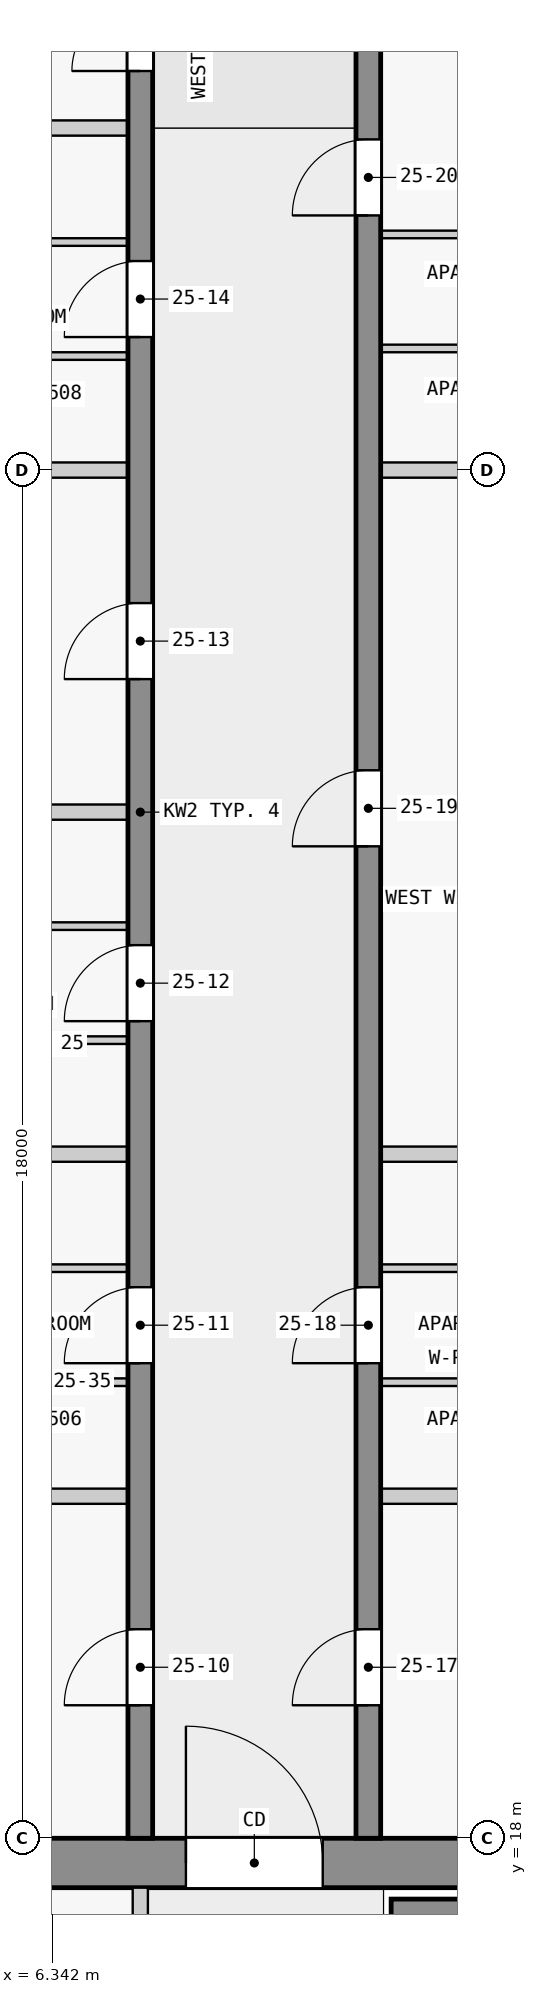
"""IFC4 building model, lengths in metres.
Left out: names, types, materials, properties, quantities, classifications, styles, units other than length and angle.
Written with IfcOpenShell. Run it as: python <this file> out.ifc"""

import sys

from ifc_helpers import new_model, si_unit, direction, frame, frame_2d, origin, place, context, subcontext, project, spatial, rectangle, extrude, element, fill, save


model = new_model("IFC4")
c1 = context("Model", 3, precision=1e-05, world=origin(), true_north=direction((0.0, 1.0)))
c2 = subcontext(c1, "Body", "Model", "MODEL_VIEW")
j1 = project(units=[si_unit("LENGTHUNIT", "METRE"), si_unit("PLANEANGLEUNIT", "RADIAN")], contexts=[c1])
p1 = place(None, origin())
s1 = spatial("IfcSite", under=j1, at=p1, CompositionType="ELEMENT")
p2 = place(p1, origin())
s2 = spatial("IfcBuilding", under=s1, at=p2, CompositionType="ELEMENT")
p3 = place(p2, frame((0.0, 0.0, 99.3)))
s3 = spatial("IfcBuildingStorey", under=s2, at=p3, CompositionType="ELEMENT", Elevation=99.3)
p4 = place(p3, frame((1.65, 17.675, 0.0), z_axis=(0.0, 0.0, 1.0), x_axis=(1.0, 0.0, 0.0)))
e1 = element("IfcWall", 1, at=p4, inside=s3, PredefinedType="SHEAR", context=c2, shape_type="SweptSolid", body=[
    extrude(rectangle(XDim=20.85, YDim=0.65, at=frame_2d((10.425, 0.0))), origin(), (0.0, 0.0, 1.0), 3.25),
])
p5 = place(p4, frame((6.45, 0.0, 0.0)))
e2 = element("IfcOpeningElement", 2, at=p5, cuts=e1, PredefinedType="OPENING", context=c2, shape_type="SweptSolid", body=[
    extrude(rectangle(XDim=1.8, YDim=2.1, at=frame_2d((0.9, 1.05))), frame((0.0, 0.335, 0.0), z_axis=(0.0, -1.0, 0.0), x_axis=(1.0, 0.0, 0.0)), (0.0, 0.0, 1.0), 0.67),
])
p6 = place(p3, frame((10.8, 17.05, 0.0), z_axis=(0.0, 0.0, 1.0), x_axis=(1.0, 0.0, 0.0)))
e3 = element("IfcWall", 3, at=p6, inside=s3, PredefinedType="SHEAR", context=c2, shape_type="SweptSolid", body=[
    extrude(rectangle(XDim=7.8, YDim=0.3, at=frame_2d((3.9, 0.0))), origin(), (0.0, 0.0, 1.0), 3.25),
])
p7 = place(p3, frame((7.5, 18.0, 0.0), z_axis=(0.0, 0.0, 1.0), x_axis=(0.0, 1.0, 0.0)))
e4 = element("IfcWall", 4, at=p7, inside=s3, PredefinedType="SHEAR", context=c2, shape_type="SweptSolid", body=[
    extrude(rectangle(XDim=27.0, YDim=0.325, at=frame_2d((13.5, 0.0))), origin(), (0.0, 0.0, 1.0), 3.25),
])
p8 = place(p7, frame((1.75, 0.0, 0.0)))
e5 = element("IfcOpeningElement", 5, at=p8, cuts=e4, PredefinedType="OPENING", context=c2, shape_type="SweptSolid", body=[
    extrude(rectangle(XDim=1.0, YDim=2.1, at=frame_2d((0.5, 1.05))), frame((0.0, 0.172, 0.0), z_axis=(0.0, -1.0, 0.0), x_axis=(1.0, 0.0, 0.0)), (0.0, 0.0, 1.0), 0.345),
])
p9 = place(p7, frame((6.25, 0.0, 0.0)))
e6 = element("IfcOpeningElement", 6, at=p9, cuts=e4, PredefinedType="OPENING", context=c2, shape_type="SweptSolid", body=[
    extrude(rectangle(XDim=1.0, YDim=2.1, at=frame_2d((0.5, 1.05))), frame((0.0, 0.172, 0.0), z_axis=(0.0, -1.0, 0.0), x_axis=(1.0, 0.0, 0.0)), (0.0, 0.0, 1.0), 0.345),
])
p10 = place(p7, frame((10.75, 0.0, 0.0)))
e7 = element("IfcOpeningElement", 7, at=p10, cuts=e4, PredefinedType="OPENING", context=c2, shape_type="SweptSolid", body=[
    extrude(rectangle(XDim=1.0, YDim=2.1, at=frame_2d((0.5, 1.05))), frame((0.0, 0.172, 0.0), z_axis=(0.0, -1.0, 0.0), x_axis=(1.0, 0.0, 0.0)), (0.0, 0.0, 1.0), 0.345),
])
p11 = place(p7, frame((15.25, 0.0, 0.0)))
e8 = element("IfcOpeningElement", 8, at=p11, cuts=e4, PredefinedType="OPENING", context=c2, shape_type="SweptSolid", body=[
    extrude(rectangle(XDim=1.0, YDim=2.1, at=frame_2d((0.5, 1.05))), frame((0.0, 0.172, 0.0), z_axis=(0.0, -1.0, 0.0), x_axis=(1.0, 0.0, 0.0)), (0.0, 0.0, 1.0), 0.345),
])
p12 = place(p7, frame((19.75, 0.0, 0.0)))
e9 = element("IfcOpeningElement", 9, at=p12, cuts=e4, PredefinedType="OPENING", context=c2, shape_type="SweptSolid", body=[
    extrude(rectangle(XDim=1.0, YDim=2.1, at=frame_2d((0.5, 1.05))), frame((0.0, 0.172, 0.0), z_axis=(0.0, -1.0, 0.0), x_axis=(1.0, 0.0, 0.0)), (0.0, 0.0, 1.0), 0.345),
])
p13 = place(p7, frame((23.25, 0.0, 0.0)))
e10 = element("IfcOpeningElement", 10, at=p13, cuts=e4, PredefinedType="OPENING", context=c2, shape_type="SweptSolid", body=[
    extrude(rectangle(XDim=0.9, YDim=2.1, at=frame_2d((0.45, 1.05))), frame((0.0, 0.172, 0.0), z_axis=(0.0, -1.0, 0.0), x_axis=(1.0, 0.0, 0.0)), (0.0, 0.0, 1.0), 0.345),
])
p14 = place(p7, frame((25.45, 0.0, 0.0)))
e11 = element("IfcOpeningElement", 11, at=p14, cuts=e4, PredefinedType="OPENING", context=c2, shape_type="SweptSolid", body=[
    extrude(rectangle(XDim=1.0, YDim=2.1, at=frame_2d((0.5, 1.05))), frame((0.0, 0.172, 0.0), z_axis=(0.0, -1.0, 0.0), x_axis=(1.0, 0.0, 0.0)), (0.0, 0.0, 1.0), 0.345),
])
p15 = place(p3, frame((10.5, 18.0, 0.0), z_axis=(0.0, 0.0, 1.0), x_axis=(0.0, 1.0, 0.0)))
e12 = element("IfcWall", 12, at=p15, inside=s3, PredefinedType="SHEAR", context=c2, shape_type="SweptSolid", body=[
    extrude(rectangle(XDim=27.0, YDim=0.325, at=frame_2d((13.5, 0.0))), origin(), (0.0, 0.0, 1.0), 3.25),
])
p16 = place(p15, frame((1.75, 0.0, 0.0)))
e13 = element("IfcOpeningElement", 13, at=p16, cuts=e12, PredefinedType="OPENING", context=c2, shape_type="SweptSolid", body=[
    extrude(rectangle(XDim=1.0, YDim=2.1, at=frame_2d((0.5, 1.05))), frame((0.0, 0.172, 0.0), z_axis=(0.0, -1.0, 0.0), x_axis=(1.0, 0.0, 0.0)), (0.0, 0.0, 1.0), 0.345),
])
p17 = place(p15, frame((6.25, 0.0, 0.0)))
e14 = element("IfcOpeningElement", 14, at=p17, cuts=e12, PredefinedType="OPENING", context=c2, shape_type="SweptSolid", body=[
    extrude(rectangle(XDim=1.0, YDim=2.1, at=frame_2d((0.5, 1.05))), frame((0.0, 0.172, 0.0), z_axis=(0.0, -1.0, 0.0), x_axis=(1.0, 0.0, 0.0)), (0.0, 0.0, 1.0), 0.345),
])
p18 = place(p15, frame((13.05, 0.0, 0.0)))
e15 = element("IfcOpeningElement", 15, at=p18, cuts=e12, PredefinedType="OPENING", context=c2, shape_type="SweptSolid", body=[
    extrude(rectangle(XDim=1.0, YDim=2.1, at=frame_2d((0.5, 1.05))), frame((0.0, 0.172, 0.0), z_axis=(0.0, -1.0, 0.0), x_axis=(1.0, 0.0, 0.0)), (0.0, 0.0, 1.0), 0.345),
])
p19 = place(p15, frame((21.35, 0.0, 0.0)))
e16 = element("IfcOpeningElement", 16, at=p19, cuts=e12, PredefinedType="OPENING", context=c2, shape_type="SweptSolid", body=[
    extrude(rectangle(XDim=1.0, YDim=2.1, at=frame_2d((0.5, 1.05))), frame((0.0, 0.172, 0.0), z_axis=(0.0, -1.0, 0.0), x_axis=(1.0, 0.0, 0.0)), (0.0, 0.0, 1.0), 0.345),
])
p20 = place(p3, frame((7.5, 10.1, 0.0), z_axis=(0.0, 0.0, 1.0), x_axis=(0.0, 1.0, 0.0)))
e17 = element("IfcWall", 17, at=p20, inside=s3, PredefinedType="PARTITIONING", context=c2, shape_type="SweptSolid", body=[
    extrude(rectangle(XDim=7.25, YDim=0.2, at=frame_2d((3.625, 0.0))), origin(), (0.0, 0.0, 1.0), 3.25),
])
p21 = place(p20, frame((1.05, 0.0, 0.0)))
e18 = element("IfcOpeningElement", 18, at=p21, cuts=e17, PredefinedType="OPENING", context=c2, shape_type="SweptSolid", body=[
    extrude(rectangle(XDim=0.9, YDim=2.1, at=frame_2d((0.45, 1.05))), frame((0.0, 0.11, 0.0), z_axis=(0.0, -1.0, 0.0), x_axis=(1.0, 0.0, 0.0)), (0.0, 0.0, 1.0), 0.22),
])
p22 = place(p20, frame((4.675, 0.0, 0.0)))
e19 = element("IfcOpeningElement", 19, at=p22, cuts=e17, PredefinedType="OPENING", context=c2, shape_type="SweptSolid", body=[
    extrude(rectangle(XDim=0.9, YDim=2.1, at=frame_2d((0.45, 1.05))), frame((0.0, 0.11, 0.0), z_axis=(0.0, -1.0, 0.0), x_axis=(1.0, 0.0, 0.0)), (0.0, 0.0, 1.0), 0.22),
])
for number, where, z_axis, x_axis in (
    (20, (7.337, 22.5, 0.0), (0.0, 0.0, 1.0), (-1.0, 0.0, 0.0)),
    (21, (17.85, 22.5, 0.0), (0.0, 0.0, 1.0), (-1.0, 0.0, 0.0)),
):
    element("IfcWall", number, at=place(p3, frame(where, z_axis=z_axis, x_axis=x_axis)), inside=s3, PredefinedType="PARTITIONING", context=c2, shape_type="SweptSolid", body=[
        extrude(rectangle(XDim=7.188, YDim=0.2, at=frame_2d((3.594, 0.0))), origin(), (0.0, 0.0, 1.0), 3.25),
    ])
p23 = place(p3, frame((7.337, 24.0, 0.0), z_axis=(0.0, 0.0, 1.0), x_axis=(-1.0, 0.0, 0.0)))
e22 = element("IfcWall", 22, at=p23, inside=s3, PredefinedType="PARTITIONING", context=c2, shape_type="SweptSolid", body=[
    extrude(rectangle(XDim=3.4, YDim=0.1, at=frame_2d((1.7, 0.0))), origin(), (0.0, 0.0, 1.0), 3.25),
])
p24 = place(p23, frame((1.25, 0.0, 0.0)))
e23 = element("IfcOpeningElement", 23, at=p24, cuts=e22, PredefinedType="OPENING", context=c2, shape_type="SweptSolid", body=[
    extrude(rectangle(XDim=0.9, YDim=2.1, at=frame_2d((0.45, 1.05))), frame((0.0, 0.06, 0.0), z_axis=(0.0, -1.0, 0.0), x_axis=(1.0, 0.0, 0.0)), (0.0, 0.0, 1.0), 0.12),
])
p25 = place(p3, frame((14.062, 24.0, 0.0), z_axis=(0.0, 0.0, 1.0), x_axis=(-1.0, 0.0, 0.0)))
e24 = element("IfcWall", 24, at=p25, inside=s3, PredefinedType="PARTITIONING", context=c2, shape_type="SweptSolid", body=[
    extrude(rectangle(XDim=3.4, YDim=0.1, at=frame_2d((1.7, 0.0))), origin(), (0.0, 0.0, 1.0), 3.25),
])
p26 = place(p25, frame((1.25, 0.0, 0.0)))
e25 = element("IfcOpeningElement", 25, at=p26, cuts=e24, PredefinedType="OPENING", context=c2, shape_type="SweptSolid", body=[
    extrude(rectangle(XDim=0.9, YDim=2.1, at=frame_2d((0.45, 1.05))), frame((0.0, 0.06, 0.0), z_axis=(0.0, -1.0, 0.0), x_axis=(1.0, 0.0, 0.0)), (0.0, 0.0, 1.0), 0.12),
])
p27 = place(p3, frame((3.938, 25.5, 0.0), z_axis=(0.0, 0.0, 1.0), x_axis=(1.0, 0.0, 0.0)))
e26 = element("IfcWall", 26, at=p27, inside=s3, PredefinedType="PARTITIONING", context=c2, shape_type="SweptSolid", body=[
    extrude(rectangle(XDim=3.4, YDim=0.1, at=frame_2d((1.7, 0.0))), origin(), (0.0, 0.0, 1.0), 3.25),
])
p28 = place(p27, frame((1.25, 0.0, 0.0)))
e27 = element("IfcOpeningElement", 27, at=p28, cuts=e26, PredefinedType="OPENING", context=c2, shape_type="SweptSolid", body=[
    extrude(rectangle(XDim=0.9, YDim=2.1, at=frame_2d((0.45, 1.05))), frame((0.0, 0.06, 0.0), z_axis=(0.0, -1.0, 0.0), x_axis=(1.0, 0.0, 0.0)), (0.0, 0.0, 1.0), 0.12),
])
p29 = place(p3, frame((10.663, 25.5, 0.0), z_axis=(0.0, 0.0, 1.0), x_axis=(1.0, 0.0, 0.0)))
e28 = element("IfcWall", 28, at=p29, inside=s3, PredefinedType="PARTITIONING", context=c2, shape_type="SweptSolid", body=[
    extrude(rectangle(XDim=3.4, YDim=0.1, at=frame_2d((1.7, 0.0))), origin(), (0.0, 0.0, 1.0), 3.25),
])
p30 = place(p29, frame((1.25, 0.0, 0.0)))
e29 = element("IfcOpeningElement", 29, at=p30, cuts=e28, PredefinedType="OPENING", context=c2, shape_type="SweptSolid", body=[
    extrude(rectangle(XDim=0.9, YDim=2.1, at=frame_2d((0.45, 1.05))), frame((0.0, 0.06, 0.0), z_axis=(0.0, -1.0, 0.0), x_axis=(1.0, 0.0, 0.0)), (0.0, 0.0, 1.0), 0.12),
])
for number, where, z_axis, x_axis in (
    (30, (7.337, 27.0, 0.0), (0.0, 0.0, 1.0), (-1.0, 0.0, 0.0)),
    (31, (13.962, 27.0, 0.0), (0.0, 0.0, 1.0), (-1.0, 0.0, 0.0)),
):
    element("IfcWall", number, at=place(p3, frame(where, z_axis=z_axis, x_axis=x_axis)), inside=s3, PredefinedType="PARTITIONING", context=c2, shape_type="SweptSolid", body=[
        extrude(rectangle(XDim=3.3, YDim=0.2, at=frame_2d((1.65, 0.0))), origin(), (0.0, 0.0, 1.0), 3.25),
    ])
p31 = place(p3, frame((7.337, 28.5, 0.0), z_axis=(0.0, 0.0, 1.0), x_axis=(-1.0, 0.0, 0.0)))
e32 = element("IfcWall", 32, at=p31, inside=s3, PredefinedType="PARTITIONING", context=c2, shape_type="SweptSolid", body=[
    extrude(rectangle(XDim=3.4, YDim=0.1, at=frame_2d((1.7, 0.0))), origin(), (0.0, 0.0, 1.0), 3.25),
])
p32 = place(p31, frame((1.25, 0.0, 0.0)))
e33 = element("IfcOpeningElement", 33, at=p32, cuts=e32, PredefinedType="OPENING", context=c2, shape_type="SweptSolid", body=[
    extrude(rectangle(XDim=0.9, YDim=2.1, at=frame_2d((0.45, 1.05))), frame((0.0, 0.06, 0.0), z_axis=(0.0, -1.0, 0.0), x_axis=(1.0, 0.0, 0.0)), (0.0, 0.0, 1.0), 0.12),
])
p33 = place(p3, frame((3.938, 30.0, 0.0), z_axis=(0.0, 0.0, 1.0), x_axis=(1.0, 0.0, 0.0)))
e34 = element("IfcWall", 34, at=p33, inside=s3, PredefinedType="PARTITIONING", context=c2, shape_type="SweptSolid", body=[
    extrude(rectangle(XDim=3.4, YDim=0.1, at=frame_2d((1.7, 0.0))), origin(), (0.0, 0.0, 1.0), 3.25),
])
p34 = place(p33, frame((1.25, 0.0, 0.0)))
e35 = element("IfcOpeningElement", 35, at=p34, cuts=e34, PredefinedType="OPENING", context=c2, shape_type="SweptSolid", body=[
    extrude(rectangle(XDim=0.9, YDim=2.1, at=frame_2d((0.45, 1.05))), frame((0.0, 0.06, 0.0), z_axis=(0.0, -1.0, 0.0), x_axis=(1.0, 0.0, 0.0)), (0.0, 0.0, 1.0), 0.12),
])
p35 = place(p3, frame((7.337, 31.5, 0.0), z_axis=(0.0, 0.0, 1.0), x_axis=(-1.0, 0.0, 0.0)))
e36 = element("IfcWall", 36, at=p35, inside=s3, PredefinedType="PARTITIONING", context=c2, shape_type="SweptSolid", body=[
    extrude(rectangle(XDim=3.3, YDim=0.2, at=frame_2d((1.65, 0.0))), origin(), (0.0, 0.0, 1.0), 3.25),
])
for number, where, z_axis, x_axis in (
    (37, (7.337, 36.0, 0.0), (0.0, 0.0, 1.0), (-1.0, 0.0, 0.0)),
    (38, (16.6, 36.0, 0.0), (0.0, 0.0, 1.0), (-1.0, 0.0, 0.0)),
):
    element("IfcWall", number, at=place(p3, frame(where, z_axis=z_axis, x_axis=x_axis)), inside=s3, PredefinedType="PARTITIONING", context=c2, shape_type="SweptSolid", body=[
        extrude(rectangle(XDim=5.938, YDim=0.2, at=frame_2d((2.969, 0.0))), origin(), (0.0, 0.0, 1.0), 3.25),
    ])
p36 = place(p3, frame((7.337, 37.5, 0.0), z_axis=(0.0, 0.0, 1.0), x_axis=(-1.0, 0.0, 0.0)))
e39 = element("IfcWall", 39, at=p36, inside=s3, PredefinedType="PARTITIONING", context=c2, shape_type="SweptSolid", body=[
    extrude(rectangle(XDim=3.4, YDim=0.1, at=frame_2d((1.7, 0.0))), origin(), (0.0, 0.0, 1.0), 3.25),
])
p37 = place(p36, frame((1.25, 0.0, 0.0)))
e40 = element("IfcOpeningElement", 40, at=p37, cuts=e39, PredefinedType="OPENING", context=c2, shape_type="SweptSolid", body=[
    extrude(rectangle(XDim=0.9, YDim=2.1, at=frame_2d((0.45, 1.05))), frame((0.0, 0.06, 0.0), z_axis=(0.0, -1.0, 0.0), x_axis=(1.0, 0.0, 0.0)), (0.0, 0.0, 1.0), 0.12),
])
p38 = place(p3, frame((14.062, 37.6, 0.0), z_axis=(0.0, 0.0, 1.0), x_axis=(-1.0, 0.0, 0.0)))
e41 = element("IfcWall", 41, at=p38, inside=s3, PredefinedType="PARTITIONING", context=c2, shape_type="SweptSolid", body=[
    extrude(rectangle(XDim=3.4, YDim=0.1, at=frame_2d((1.7, 0.0))), origin(), (0.0, 0.0, 1.0), 3.25),
])
p39 = place(p3, frame((3.938, 39.0, 0.0), z_axis=(0.0, 0.0, 1.0), x_axis=(1.0, 0.0, 0.0)))
e42 = element("IfcWall", 42, at=p39, inside=s3, PredefinedType="PARTITIONING", context=c2, shape_type="SweptSolid", body=[
    extrude(rectangle(XDim=3.4, YDim=0.1, at=frame_2d((1.7, 0.0))), origin(), (0.0, 0.0, 1.0), 3.25),
])
p40 = place(p39, frame((1.25, 0.0, 0.0)))
e43 = element("IfcOpeningElement", 43, at=p40, cuts=e42, PredefinedType="OPENING", context=c2, shape_type="SweptSolid", body=[
    extrude(rectangle(XDim=0.9, YDim=2.1, at=frame_2d((0.45, 1.05))), frame((0.0, 0.06, 0.0), z_axis=(0.0, -1.0, 0.0), x_axis=(1.0, 0.0, 0.0)), (0.0, 0.0, 1.0), 0.12),
])
p41 = place(p3, frame((14.062, 39.1, 0.0), z_axis=(0.0, 0.0, 1.0), x_axis=(-1.0, 0.0, 0.0)))
e44 = element("IfcWall", 44, at=p41, inside=s3, PredefinedType="PARTITIONING", context=c2, shape_type="SweptSolid", body=[
    extrude(rectangle(XDim=3.4, YDim=0.1, at=frame_2d((1.7, 0.0))), origin(), (0.0, 0.0, 1.0), 3.25),
])
p42 = place(p41, frame((1.25, 0.0, 0.0)))
e45 = element("IfcOpeningElement", 45, at=p42, cuts=e44, PredefinedType="OPENING", context=c2, shape_type="SweptSolid", body=[
    extrude(rectangle(XDim=0.9, YDim=2.1, at=frame_2d((0.45, 1.05))), frame((0.0, 0.06, 0.0), z_axis=(0.0, -1.0, 0.0), x_axis=(1.0, 0.0, 0.0)), (0.0, 0.0, 1.0), 0.12),
])
p43 = place(p3, frame((7.337, 40.5, 0.0), z_axis=(0.0, 0.0, 1.0), x_axis=(-1.0, 0.0, 0.0)))
e46 = element("IfcWall", 46, at=p43, inside=s3, PredefinedType="PARTITIONING", context=c2, shape_type="SweptSolid", body=[
    extrude(rectangle(XDim=3.3, YDim=0.2, at=frame_2d((1.65, 0.0))), origin(), (0.0, 0.0, 1.0), 3.25),
])
p44 = place(p5, origin())
e47 = element("IfcDoor", 47, at=p44, inside=s3, OperationType="DOUBLE_DOOR_SINGLE_SWING", PredefinedType="DOOR", context=c2, shape_type="SweptSolid", body=[
    extrude(rectangle(XDim=1.8, YDim=2.1, at=frame_2d((0.9, 1.05))), frame((0.0, 0.025, 0.0), z_axis=(0.0, -1.0, 0.0), x_axis=(1.0, 0.0, 0.0)), (0.0, 0.0, 1.0), 0.05),
])
fill(e2, e47)
p45 = place(p8, origin())
e48 = element("IfcDoor", 48, at=p45, inside=s3, OperationType="SINGLE_SWING_LEFT", PredefinedType="DOOR", context=c2, shape_type="SweptSolid", body=[
    extrude(rectangle(XDim=1.0, YDim=2.1, at=frame_2d((0.5, 1.05))), frame((0.0, 0.025, 0.0), z_axis=(0.0, -1.0, 0.0), x_axis=(1.0, 0.0, 0.0)), (0.0, 0.0, 1.0), 0.05),
])
fill(e5, e48)
p46 = place(p9, origin())
e49 = element("IfcDoor", 49, at=p46, inside=s3, OperationType="SINGLE_SWING_LEFT", PredefinedType="DOOR", context=c2, shape_type="SweptSolid", body=[
    extrude(rectangle(XDim=1.0, YDim=2.1, at=frame_2d((0.5, 1.05))), frame((0.0, 0.025, 0.0), z_axis=(0.0, -1.0, 0.0), x_axis=(1.0, 0.0, 0.0)), (0.0, 0.0, 1.0), 0.05),
])
fill(e6, e49)
p47 = place(p10, origin())
e50 = element("IfcDoor", 50, at=p47, inside=s3, OperationType="SINGLE_SWING_LEFT", PredefinedType="DOOR", context=c2, shape_type="SweptSolid", body=[
    extrude(rectangle(XDim=1.0, YDim=2.1, at=frame_2d((0.5, 1.05))), frame((0.0, 0.025, 0.0), z_axis=(0.0, -1.0, 0.0), x_axis=(1.0, 0.0, 0.0)), (0.0, 0.0, 1.0), 0.05),
])
fill(e7, e50)
p48 = place(p11, origin())
e51 = element("IfcDoor", 51, at=p48, inside=s3, OperationType="SINGLE_SWING_RIGHT", PredefinedType="DOOR", context=c2, shape_type="SweptSolid", body=[
    extrude(rectangle(XDim=1.0, YDim=2.1, at=frame_2d((0.5, 1.05))), frame((0.0, 0.025, 0.0), z_axis=(0.0, -1.0, 0.0), x_axis=(1.0, 0.0, 0.0)), (0.0, 0.0, 1.0), 0.05),
])
fill(e8, e51)
p49 = place(p12, origin())
e52 = element("IfcDoor", 52, at=p49, inside=s3, OperationType="SINGLE_SWING_RIGHT", PredefinedType="DOOR", context=c2, shape_type="SweptSolid", body=[
    extrude(rectangle(XDim=1.0, YDim=2.1, at=frame_2d((0.5, 1.05))), frame((0.0, 0.025, 0.0), z_axis=(0.0, -1.0, 0.0), x_axis=(1.0, 0.0, 0.0)), (0.0, 0.0, 1.0), 0.05),
])
fill(e9, e52)
p50 = place(p13, origin())
e53 = element("IfcDoor", 53, at=p50, inside=s3, OperationType="SINGLE_SWING_RIGHT", PredefinedType="DOOR", context=c2, shape_type="SweptSolid", body=[
    extrude(rectangle(XDim=0.9, YDim=2.1, at=frame_2d((0.45, 1.05))), frame((0.0, 0.025, 0.0), z_axis=(0.0, -1.0, 0.0), x_axis=(1.0, 0.0, 0.0)), (0.0, 0.0, 1.0), 0.05),
])
fill(e10, e53)
p51 = place(p16, origin())
e54 = element("IfcDoor", 54, at=p51, inside=s3, OperationType="SINGLE_SWING_LEFT", PredefinedType="DOOR", context=c2, shape_type="SweptSolid", body=[
    extrude(rectangle(XDim=1.0, YDim=2.1, at=frame_2d((0.5, 1.05))), frame((0.0, 0.025, 0.0), z_axis=(0.0, -1.0, 0.0), x_axis=(1.0, 0.0, 0.0)), (0.0, 0.0, 1.0), 0.05),
])
fill(e13, e54)
p52 = place(p17, origin())
e55 = element("IfcDoor", 55, at=p52, inside=s3, OperationType="SINGLE_SWING_LEFT", PredefinedType="DOOR", context=c2, shape_type="SweptSolid", body=[
    extrude(rectangle(XDim=1.0, YDim=2.1, at=frame_2d((0.5, 1.05))), frame((0.0, 0.025, 0.0), z_axis=(0.0, -1.0, 0.0), x_axis=(1.0, 0.0, 0.0)), (0.0, 0.0, 1.0), 0.05),
])
fill(e14, e55)
p53 = place(p18, origin())
e56 = element("IfcDoor", 56, at=p53, inside=s3, OperationType="SINGLE_SWING_RIGHT", PredefinedType="DOOR", context=c2, shape_type="SweptSolid", body=[
    extrude(rectangle(XDim=1.0, YDim=2.1, at=frame_2d((0.5, 1.05))), frame((0.0, 0.025, 0.0), z_axis=(0.0, -1.0, 0.0), x_axis=(1.0, 0.0, 0.0)), (0.0, 0.0, 1.0), 0.05),
])
fill(e15, e56)
p54 = place(p19, origin())
e57 = element("IfcDoor", 57, at=p54, inside=s3, OperationType="SINGLE_SWING_RIGHT", PredefinedType="DOOR", context=c2, shape_type="SweptSolid", body=[
    extrude(rectangle(XDim=1.0, YDim=2.1, at=frame_2d((0.5, 1.05))), frame((0.0, 0.025, 0.0), z_axis=(0.0, -1.0, 0.0), x_axis=(1.0, 0.0, 0.0)), (0.0, 0.0, 1.0), 0.05),
])
fill(e16, e57)
save(model, sys.argv[1])
